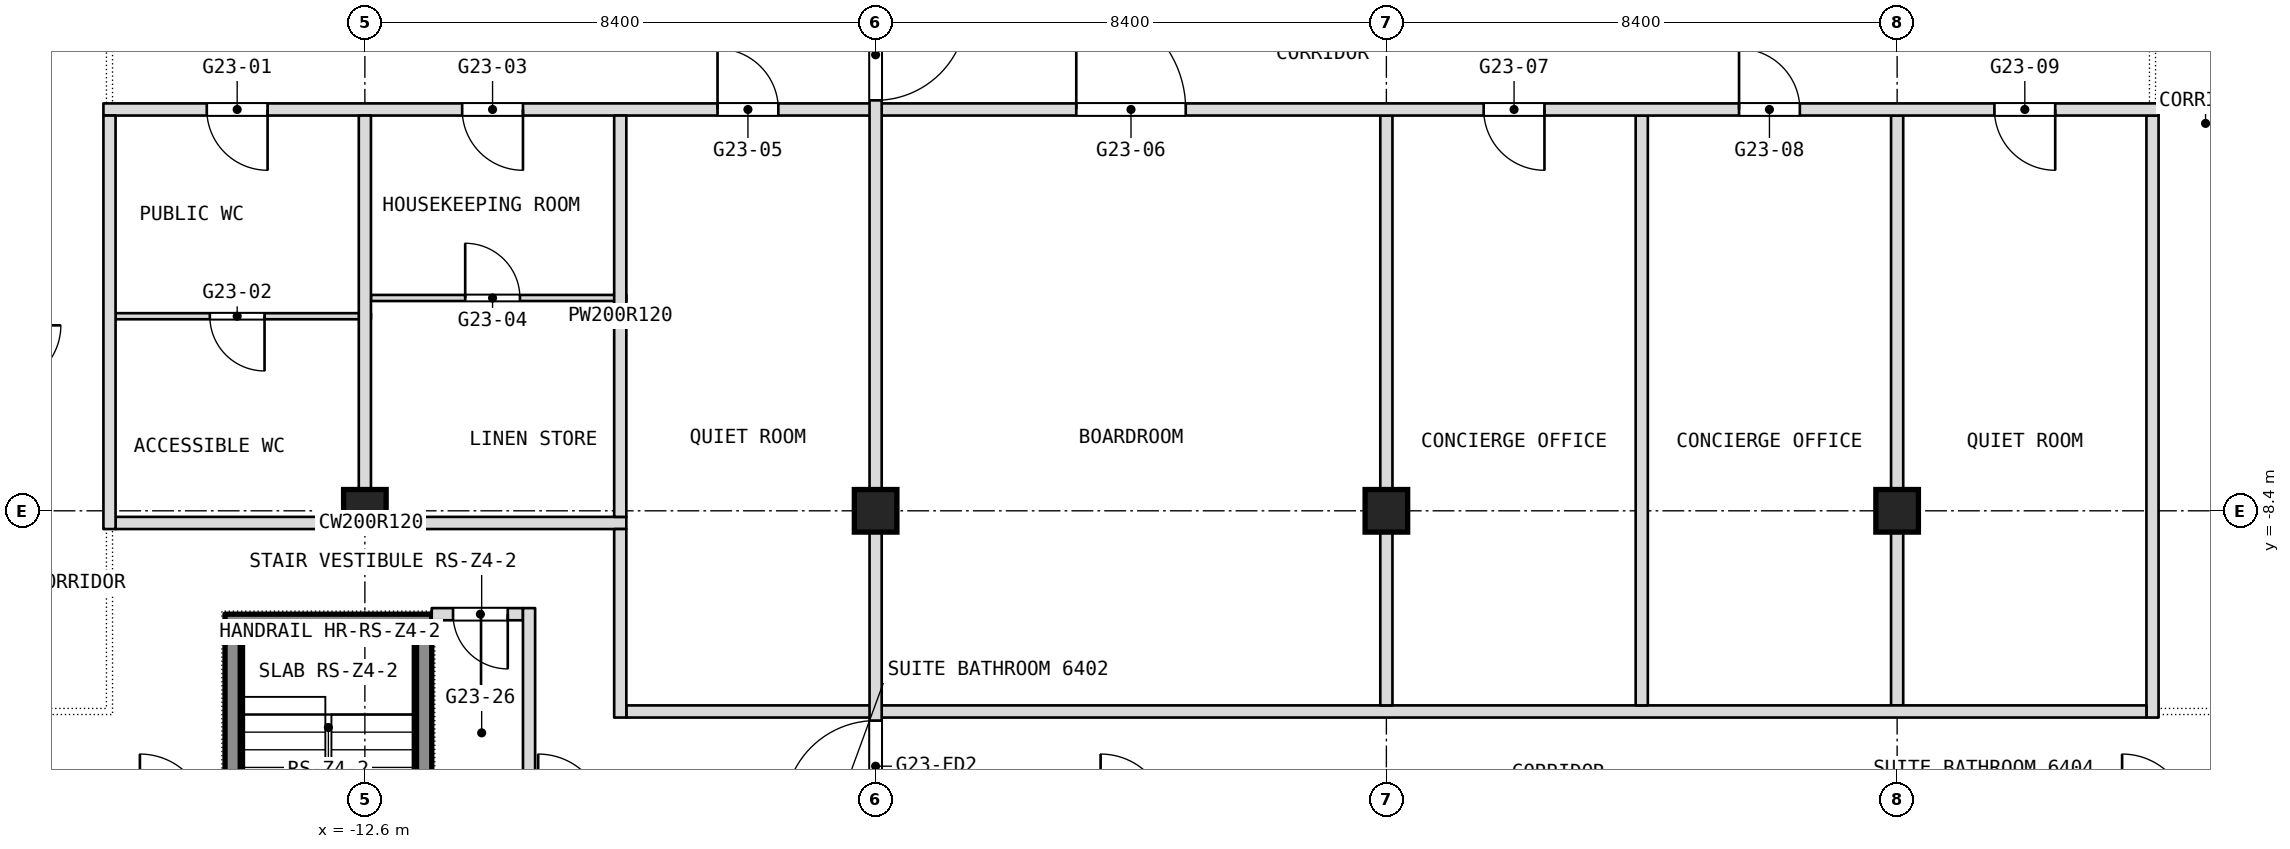
"""IFC4 building model, lengths in metres.
Left out: names, types, materials, properties, quantities, classifications, styles, units other than length and angle.
Written with IfcOpenShell. Run it as: python <this file> out.ifc"""

import sys

from ifc_helpers import new_model, si_unit, direction, frame, frame_2d, origin, origin_2d, place, context, subcontext, project, spatial, rectangle, extrude, element, fill, save


model = new_model("IFC4")
c1 = context("Model", 3, precision=1e-05, world=origin(), true_north=direction((0.0, 1.0)))
c2 = subcontext(c1, "Body", "Model", "MODEL_VIEW")
j1 = project(units=[si_unit("LENGTHUNIT", "METRE"), si_unit("PLANEANGLEUNIT", "RADIAN")], contexts=[c1])
p1 = place(None, origin())
s1 = spatial("IfcSite", under=j1, at=p1, CompositionType="ELEMENT")
p2 = place(p1, origin())
s2 = spatial("IfcBuilding", under=s1, at=p2, CompositionType="ELEMENT")
p3 = place(p2, frame((0.0, 0.0, 277.7)))
s3 = spatial("IfcBuildingStorey", under=s2, at=p3, CompositionType="ELEMENT", Elevation=277.7)
for number, where, z_axis, x_axis in (
    (1, (-12.6, -8.4, 0.0), (0.0, 0.0, 1.0), (1.0, 0.0, 0.0)),
    (2, (-4.2, -8.4, 0.0), (0.0, 0.0, 1.0), (1.0, 0.0, 0.0)),
    (3, (4.2, -8.4, 0.0), (0.0, 0.0, 1.0), (1.0, 0.0, 0.0)),
    (4, (12.6, -8.4, 0.0), (0.0, 0.0, 1.0), (1.0, 0.0, 0.0)),
):
    element("IfcColumn", number, at=place(p3, frame(where, z_axis=z_axis, x_axis=x_axis)), inside=s3, PredefinedType="COLUMN", context=c2, shape_type="SweptSolid", body=[
        extrude(rectangle(XDim=0.7, YDim=0.7, at=origin_2d()), origin(), (0.0, 0.0, 1.0), 3.6),
    ])
p4 = place(p3, frame((16.8, -11.8, 0.0), z_axis=(0.0, 0.0, 1.0), x_axis=(0.0, 1.0, 0.0)))
e5 = element("IfcWall", 5, at=p4, inside=s3, PredefinedType="PARTITIONING", context=c2, shape_type="SweptSolid", body=[
    extrude(rectangle(XDim=9.9, YDim=0.2, at=frame_2d((4.95, 0.0))), origin(), (0.0, 0.0, 1.0), 3.34),
])
p5 = place(p3, frame((12.6, -11.6, 0.0), z_axis=(0.0, 0.0, 1.0), x_axis=(0.0, 1.0, 0.0)))
e6 = element("IfcWall", 6, at=p5, inside=s3, PredefinedType="PARTITIONING", context=c2, shape_type="SweptSolid", body=[
    extrude(rectangle(XDim=9.7, YDim=0.2, at=frame_2d((4.85, 0.0))), origin(), (0.0, 0.0, 1.0), 3.34),
])
p6 = place(p3, frame((-8.3, -11.7, 0.0), z_axis=(0.0, 0.0, 1.0), x_axis=(1.0, 0.0, 0.0)))
e7 = element("IfcWall", 7, at=p6, inside=s3, PredefinedType="PARTITIONING", context=c2, shape_type="SweptSolid", body=[
    extrude(rectangle(XDim=25.0, YDim=0.2, at=frame_2d((12.5, 0.0))), origin(), (0.0, 0.0, 1.0), 3.34),
])
p7 = place(p3, frame((-11.5, -10.1, 0.0), z_axis=(0.0, 0.0, 1.0), x_axis=(1.0, 0.0, 0.0)))
e8 = element("IfcWall", 8, at=p7, inside=s3, PredefinedType="PARTITIONING", context=c2, shape_type="SweptSolid", body=[
    extrude(rectangle(XDim=1.5, YDim=0.2, at=frame_2d((0.75, 0.0))), origin(), (0.0, 0.0, 1.0), 3.34),
])
p8 = place(p7, frame((0.35, 0.0, 0.0)))
e9 = element("IfcOpeningElement", 9, at=p8, cuts=e8, PredefinedType="OPENING", context=c2, shape_type="SweptSolid", body=[
    extrude(rectangle(XDim=0.9, YDim=2.1, at=frame_2d((0.45, 1.05))), frame((0.0, 0.1, 0.0), z_axis=(0.0, -1.0, 0.0), x_axis=(1.0, 0.0, 0.0)), (0.0, 0.0, 1.0), 0.2),
])
p9 = place(p3, frame((-16.7, -8.6, 0.0), z_axis=(0.0, 0.0, 1.0), x_axis=(1.0, 0.0, 0.0)))
e10 = element("IfcWall", 10, at=p9, inside=s3, PredefinedType="PARTITIONING", context=c2, shape_type="SweptSolid", body=[
    extrude(rectangle(XDim=8.4, YDim=0.2, at=frame_2d((4.2, 0.0))), origin(), (0.0, 0.0, 1.0), 3.34),
])
p10 = place(p3, frame((8.4, -11.6, 0.0), z_axis=(0.0, 0.0, 1.0), x_axis=(0.0, 1.0, 0.0)))
e11 = element("IfcWall", 11, at=p10, inside=s3, PredefinedType="PARTITIONING", context=c2, shape_type="SweptSolid", body=[
    extrude(rectangle(XDim=9.7, YDim=0.2, at=frame_2d((4.85, 0.0))), origin(), (0.0, 0.0, 1.0), 3.34),
])
p11 = place(p3, frame((-16.7, -5.2, 0.0), z_axis=(0.0, 0.0, 1.0), x_axis=(1.0, 0.0, 0.0)))
e12 = element("IfcWall", 12, at=p11, inside=s3, PredefinedType="PARTITIONING", context=c2, shape_type="SweptSolid", body=[
    extrude(rectangle(XDim=4.2, YDim=0.1, at=frame_2d((2.1, 0.0))), origin(), (0.0, 0.0, 1.0), 3.34),
])
p12 = place(p11, frame((1.55, 0.0, 0.0)))
e13 = element("IfcOpeningElement", 13, at=p12, cuts=e12, PredefinedType="OPENING", context=c2, shape_type="SweptSolid", body=[
    extrude(rectangle(XDim=0.9, YDim=2.1, at=frame_2d((0.45, 1.05))), frame((0.0, 0.05, 0.0), z_axis=(0.0, -1.0, 0.0), x_axis=(1.0, 0.0, 0.0)), (0.0, 0.0, 1.0), 0.1),
])
p13 = place(p3, frame((-12.5, -4.9, 0.0), z_axis=(0.0, 0.0, 1.0), x_axis=(1.0, 0.0, 0.0)))
e14 = element("IfcWall", 14, at=p13, inside=s3, PredefinedType="PARTITIONING", context=c2, shape_type="SweptSolid", body=[
    extrude(rectangle(XDim=4.2, YDim=0.1, at=frame_2d((2.1, 0.0))), origin(), (0.0, 0.0, 1.0), 3.34),
])
p14 = place(p13, frame((1.55, 0.0, 0.0)))
e15 = element("IfcOpeningElement", 15, at=p14, cuts=e14, PredefinedType="OPENING", context=c2, shape_type="SweptSolid", body=[
    extrude(rectangle(XDim=0.9, YDim=2.1, at=frame_2d((0.45, 1.05))), frame((0.0, 0.05, 0.0), z_axis=(0.0, -1.0, 0.0), x_axis=(1.0, 0.0, 0.0)), (0.0, 0.0, 1.0), 0.1),
])
p15 = place(p3, frame((4.2, -11.6, 0.0), z_axis=(0.0, 0.0, 1.0), x_axis=(0.0, 1.0, 0.0)))
e16 = element("IfcWall", 16, at=p15, inside=s3, PredefinedType="PARTITIONING", context=c2, shape_type="SweptSolid", body=[
    extrude(rectangle(XDim=9.7, YDim=0.2, at=frame_2d((4.85, 0.0))), origin(), (0.0, 0.0, 1.0), 3.34),
])
p16 = place(p3, frame((-16.9, -1.8, 0.0), z_axis=(0.0, 0.0, 1.0), x_axis=(1.0, 0.0, 0.0)))
e17 = element("IfcWall", 17, at=p16, inside=s3, PredefinedType="PARTITIONING", context=c2, shape_type="SweptSolid", body=[
    extrude(rectangle(XDim=33.8, YDim=0.2, at=frame_2d((16.9, 0.0))), origin(), (0.0, 0.0, 1.0), 3.34),
])
p17 = place(p16, frame((1.7, 0.0, 0.0)))
e18 = element("IfcOpeningElement", 18, at=p17, cuts=e17, PredefinedType="OPENING", context=c2, shape_type="SweptSolid", body=[
    extrude(rectangle(XDim=1.0, YDim=2.1, at=frame_2d((0.5, 1.05))), frame((0.0, 0.1, 0.0), z_axis=(0.0, -1.0, 0.0), x_axis=(1.0, 0.0, 0.0)), (0.0, 0.0, 1.0), 0.2),
])
p18 = place(p16, frame((5.9, 0.0, 0.0)))
e19 = element("IfcOpeningElement", 19, at=p18, cuts=e17, PredefinedType="OPENING", context=c2, shape_type="SweptSolid", body=[
    extrude(rectangle(XDim=1.0, YDim=2.1, at=frame_2d((0.5, 1.05))), frame((0.0, 0.1, 0.0), z_axis=(0.0, -1.0, 0.0), x_axis=(1.0, 0.0, 0.0)), (0.0, 0.0, 1.0), 0.2),
])
p19 = place(p16, frame((10.1, 0.0, 0.0)))
e20 = element("IfcOpeningElement", 20, at=p19, cuts=e17, PredefinedType="OPENING", context=c2, shape_type="SweptSolid", body=[
    extrude(rectangle(XDim=1.0, YDim=2.1, at=frame_2d((0.5, 1.05))), frame((0.0, 0.1, 0.0), z_axis=(0.0, -1.0, 0.0), x_axis=(1.0, 0.0, 0.0)), (0.0, 0.0, 1.0), 0.2),
])
p20 = place(p16, frame((16.0, 0.0, 0.0)))
e21 = element("IfcOpeningElement", 21, at=p20, cuts=e17, PredefinedType="OPENING", context=c2, shape_type="SweptSolid", body=[
    extrude(rectangle(XDim=1.8, YDim=2.1, at=frame_2d((0.9, 1.05))), frame((0.0, 0.1, 0.0), z_axis=(0.0, -1.0, 0.0), x_axis=(1.0, 0.0, 0.0)), (0.0, 0.0, 1.0), 0.2),
])
p21 = place(p16, frame((22.7, 0.0, 0.0)))
e22 = element("IfcOpeningElement", 22, at=p21, cuts=e17, PredefinedType="OPENING", context=c2, shape_type="SweptSolid", body=[
    extrude(rectangle(XDim=1.0, YDim=2.1, at=frame_2d((0.5, 1.05))), frame((0.0, 0.1, 0.0), z_axis=(0.0, -1.0, 0.0), x_axis=(1.0, 0.0, 0.0)), (0.0, 0.0, 1.0), 0.2),
])
p22 = place(p16, frame((26.9, 0.0, 0.0)))
e23 = element("IfcOpeningElement", 23, at=p22, cuts=e17, PredefinedType="OPENING", context=c2, shape_type="SweptSolid", body=[
    extrude(rectangle(XDim=1.0, YDim=2.1, at=frame_2d((0.5, 1.05))), frame((0.0, 0.1, 0.0), z_axis=(0.0, -1.0, 0.0), x_axis=(1.0, 0.0, 0.0)), (0.0, 0.0, 1.0), 0.2),
])
p23 = place(p16, frame((31.1, 0.0, 0.0)))
e24 = element("IfcOpeningElement", 24, at=p23, cuts=e17, PredefinedType="OPENING", context=c2, shape_type="SweptSolid", body=[
    extrude(rectangle(XDim=1.0, YDim=2.1, at=frame_2d((0.5, 1.05))), frame((0.0, 0.1, 0.0), z_axis=(0.0, -1.0, 0.0), x_axis=(1.0, 0.0, 0.0)), (0.0, 0.0, 1.0), 0.2),
])
p24 = place(p3, frame((-4.2, -13.6, 0.0), z_axis=(0.0, 0.0, 1.0), x_axis=(0.0, 1.0, 0.0)))
e25 = element("IfcWall", 25, at=p24, inside=s3, PredefinedType="PARTITIONING", context=c2, shape_type="SweptSolid", body=[
    extrude(rectangle(XDim=13.6, YDim=0.2, at=frame_2d((6.8, 0.0))), origin(), (0.0, 0.0, 1.0), 3.34),
])
p25 = place(p24, frame((11.95, 0.0, 0.0)))
e26 = element("IfcOpeningElement", 26, at=p25, cuts=e25, PredefinedType="OPENING", context=c2, shape_type="SweptSolid", body=[
    extrude(rectangle(XDim=1.5, YDim=2.1, at=frame_2d((0.75, 1.05))), frame((0.0, 0.1, 0.0), z_axis=(0.0, -1.0, 0.0), x_axis=(1.0, 0.0, 0.0)), (0.0, 0.0, 1.0), 0.2),
])
p26 = place(p24, frame((0.25, 0.0, 0.0)))
e27 = element("IfcOpeningElement", 27, at=p26, cuts=e25, PredefinedType="OPENING", context=c2, shape_type="SweptSolid", body=[
    extrude(rectangle(XDim=1.5, YDim=2.1, at=frame_2d((0.75, 1.05))), frame((0.0, 0.1, 0.0), z_axis=(0.0, -1.0, 0.0), x_axis=(1.0, 0.0, 0.0)), (0.0, 0.0, 1.0), 0.2),
])
p27 = place(p3, frame((-8.4, -11.8, 0.0), z_axis=(0.0, 0.0, 1.0), x_axis=(0.0, 1.0, 0.0)))
e28 = element("IfcWall", 28, at=p27, inside=s3, PredefinedType="PARTITIONING", context=c2, shape_type="SweptSolid", body=[
    extrude(rectangle(XDim=3.1, YDim=0.2, at=frame_2d((1.55, 0.0))), origin(), (0.0, 0.0, 1.0), 3.34),
])
p28 = place(p3, frame((-8.4, -8.5, 0.0), z_axis=(0.0, 0.0, 1.0), x_axis=(0.0, 1.0, 0.0)))
e29 = element("IfcWall", 29, at=p28, inside=s3, PredefinedType="PARTITIONING", context=c2, shape_type="SweptSolid", body=[
    extrude(rectangle(XDim=6.6, YDim=0.2, at=frame_2d((3.3, 0.0))), origin(), (0.0, 0.0, 1.0), 3.34),
])
p29 = place(p3, frame((-9.9, -13.4, 0.0), z_axis=(0.0, 0.0, 1.0), x_axis=(0.0, 1.0, 0.0)))
e30 = element("IfcWall", 30, at=p29, inside=s3, PredefinedType="PARTITIONING", context=c2, shape_type="SweptSolid", body=[
    extrude(rectangle(XDim=3.4, YDim=0.2, at=frame_2d((1.7, 0.0))), origin(), (0.0, 0.0, 1.0), 3.34),
])
p30 = place(p3, frame((-12.6, -8.5, 0.0), z_axis=(0.0, 0.0, 1.0), x_axis=(0.0, 1.0, 0.0)))
e31 = element("IfcWall", 31, at=p30, inside=s3, PredefinedType="PARTITIONING", context=c2, shape_type="SweptSolid", body=[
    extrude(rectangle(XDim=6.6, YDim=0.2, at=frame_2d((3.3, 0.0))), origin(), (0.0, 0.0, 1.0), 3.34),
])
p31 = place(p3, frame((-16.8, -8.7, 0.0), z_axis=(0.0, 0.0, 1.0), x_axis=(0.0, 1.0, 0.0)))
e32 = element("IfcWall", 32, at=p31, inside=s3, PredefinedType="PARTITIONING", context=c2, shape_type="SweptSolid", body=[
    extrude(rectangle(XDim=6.8, YDim=0.2, at=frame_2d((3.4, 0.0))), origin(), (0.0, 0.0, 1.0), 3.34),
])
p32 = place(p3, frame((-14.9, -10.225, 0.1), z_axis=(0.0, 0.0, 1.0), x_axis=(1.0, 0.0, 0.0)))
e33 = element("IfcWall", 33, at=p32, inside=s3, PredefinedType="SHEAR", context=c2, shape_type="SweptSolid", body=[
    extrude(rectangle(XDim=3.4, YDim=0.25, at=frame_2d((1.7, 0.0))), origin(), (0.0, 0.0, 1.0), 3.6),
])
p33 = place(p3, frame((-14.775, -16.05, 0.1), z_axis=(0.0, 0.0, 1.0), x_axis=(0.0, 1.0, 0.0)))
e34 = element("IfcWall", 34, at=p33, inside=s3, PredefinedType="SHEAR", context=c2, shape_type="SweptSolid", body=[
    extrude(rectangle(XDim=5.7, YDim=0.25, at=frame_2d((2.85, 0.0))), origin(), (0.0, 0.0, 1.0), 3.6),
])
p34 = place(p3, frame((-11.625, -16.05, 0.1), z_axis=(0.0, 0.0, 1.0), x_axis=(0.0, 1.0, 0.0)))
e35 = element("IfcWall", 35, at=p34, inside=s3, PredefinedType="SHEAR", context=c2, shape_type="SweptSolid", body=[
    extrude(rectangle(XDim=5.7, YDim=0.25, at=frame_2d((2.85, 0.0))), origin(), (0.0, 0.0, 1.0), 3.6),
])
p35 = place(p34, frame((0.2, 0.0, 0.0)))
e36 = element("IfcOpeningElement", 36, at=p35, cuts=e35, PredefinedType="OPENING", context=c2, shape_type="SweptSolid", body=[
    extrude(rectangle(XDim=1.0, YDim=2.1, at=frame_2d((0.5, 1.05))), frame((0.0, 0.125, 0.0), z_axis=(0.0, -1.0, 0.0), x_axis=(1.0, 0.0, 0.0)), (0.0, 0.0, 1.0), 0.25),
])
p36 = place(p17, origin())
e37 = element("IfcDoor", 37, at=p36, inside=s3, OperationType="SINGLE_SWING_LEFT", PredefinedType="DOOR", context=c2, shape_type="SweptSolid", body=[
    extrude(rectangle(XDim=1.0, YDim=2.1, at=frame_2d((0.5, 1.05))), frame((0.0, 0.025, 0.0), z_axis=(0.0, -1.0, 0.0), x_axis=(1.0, 0.0, 0.0)), (0.0, 0.0, 1.0), 0.05),
])
fill(e18, e37)
p37 = place(p12, origin())
e38 = element("IfcDoor", 38, at=p37, inside=s3, OperationType="SINGLE_SWING_RIGHT", PredefinedType="DOOR", context=c2, shape_type="SweptSolid", body=[
    extrude(rectangle(XDim=0.9, YDim=2.1, at=frame_2d((0.45, 1.05))), frame((0.0, 0.025, 0.0), z_axis=(0.0, -1.0, 0.0), x_axis=(1.0, 0.0, 0.0)), (0.0, 0.0, 1.0), 0.05),
])
fill(e13, e38)
p38 = place(p18, origin())
e39 = element("IfcDoor", 39, at=p38, inside=s3, OperationType="SINGLE_SWING_LEFT", PredefinedType="DOOR", context=c2, shape_type="SweptSolid", body=[
    extrude(rectangle(XDim=1.0, YDim=2.1, at=frame_2d((0.5, 1.05))), frame((0.0, 0.025, 0.0), z_axis=(0.0, -1.0, 0.0), x_axis=(1.0, 0.0, 0.0)), (0.0, 0.0, 1.0), 0.05),
])
fill(e19, e39)
p39 = place(p14, origin())
e40 = element("IfcDoor", 40, at=p39, inside=s3, OperationType="SINGLE_SWING_RIGHT", PredefinedType="DOOR", context=c2, shape_type="SweptSolid", body=[
    extrude(rectangle(XDim=0.9, YDim=2.1, at=frame_2d((0.45, 1.05))), frame((0.0, 0.025, 0.0), z_axis=(0.0, -1.0, 0.0), x_axis=(1.0, 0.0, 0.0)), (0.0, 0.0, 1.0), 0.05),
])
fill(e15, e40)
p40 = place(p19, origin())
e41 = element("IfcDoor", 41, at=p40, inside=s3, OperationType="SINGLE_SWING_RIGHT", PredefinedType="DOOR", context=c2, shape_type="SweptSolid", body=[
    extrude(rectangle(XDim=1.0, YDim=2.1, at=frame_2d((0.5, 1.05))), frame((0.0, 0.025, 0.0), z_axis=(0.0, -1.0, 0.0), x_axis=(1.0, 0.0, 0.0)), (0.0, 0.0, 1.0), 0.05),
])
fill(e20, e41)
p41 = place(p20, origin())
e42 = element("IfcDoor", 42, at=p41, inside=s3, OperationType="DOUBLE_DOOR_SINGLE_SWING", PredefinedType="DOOR", context=c2, shape_type="SweptSolid", body=[
    extrude(rectangle(XDim=1.8, YDim=2.1, at=frame_2d((0.9, 1.05))), frame((0.0, 0.025, 0.0), z_axis=(0.0, -1.0, 0.0), x_axis=(1.0, 0.0, 0.0)), (0.0, 0.0, 1.0), 0.05),
])
fill(e21, e42)
p42 = place(p21, origin())
e43 = element("IfcDoor", 43, at=p42, inside=s3, OperationType="SINGLE_SWING_RIGHT", PredefinedType="DOOR", context=c2, shape_type="SweptSolid", body=[
    extrude(rectangle(XDim=1.0, YDim=2.1, at=frame_2d((0.5, 1.05))), frame((0.0, 0.025, 0.0), z_axis=(0.0, -1.0, 0.0), x_axis=(1.0, 0.0, 0.0)), (0.0, 0.0, 1.0), 0.05),
])
fill(e22, e43)
p43 = place(p22, origin())
e44 = element("IfcDoor", 44, at=p43, inside=s3, OperationType="SINGLE_SWING_LEFT", PredefinedType="DOOR", context=c2, shape_type="SweptSolid", body=[
    extrude(rectangle(XDim=1.0, YDim=2.1, at=frame_2d((0.5, 1.05))), frame((0.0, 0.025, 0.0), z_axis=(0.0, -1.0, 0.0), x_axis=(1.0, 0.0, 0.0)), (0.0, 0.0, 1.0), 0.05),
])
fill(e23, e44)
p44 = place(p23, origin())
e45 = element("IfcDoor", 45, at=p44, inside=s3, OperationType="SINGLE_SWING_RIGHT", PredefinedType="DOOR", context=c2, shape_type="SweptSolid", body=[
    extrude(rectangle(XDim=1.0, YDim=2.1, at=frame_2d((0.5, 1.05))), frame((0.0, 0.025, 0.0), z_axis=(0.0, -1.0, 0.0), x_axis=(1.0, 0.0, 0.0)), (0.0, 0.0, 1.0), 0.05),
])
fill(e24, e45)
p45 = place(p8, origin())
e46 = element("IfcDoor", 46, at=p45, inside=s3, OperationType="SINGLE_SWING_LEFT", PredefinedType="DOOR", context=c2, shape_type="SweptSolid", body=[
    extrude(rectangle(XDim=0.9, YDim=2.1, at=frame_2d((0.45, 1.05))), frame((0.0, 0.025, 0.0), z_axis=(0.0, -1.0, 0.0), x_axis=(1.0, 0.0, 0.0)), (0.0, 0.0, 1.0), 0.05),
])
fill(e9, e46)
p46 = place(p25, origin())
e47 = element("IfcDoor", 47, at=p46, inside=s3, OperationType="DOUBLE_DOOR_DOUBLE_SWING", PredefinedType="DOOR", context=c2, shape_type="SweptSolid", body=[
    extrude(rectangle(XDim=1.5, YDim=2.1, at=frame_2d((0.75, 1.05))), frame((0.0, 0.025, 0.0), z_axis=(0.0, -1.0, 0.0), x_axis=(1.0, 0.0, 0.0)), (0.0, 0.0, 1.0), 0.05),
])
fill(e26, e47)
p47 = place(p26, origin())
e48 = element("IfcDoor", 48, at=p47, inside=s3, OperationType="DOUBLE_DOOR_DOUBLE_SWING", PredefinedType="DOOR", context=c2, shape_type="SweptSolid", body=[
    extrude(rectangle(XDim=1.5, YDim=2.1, at=frame_2d((0.75, 1.05))), frame((0.0, 0.025, 0.0), z_axis=(0.0, -1.0, 0.0), x_axis=(1.0, 0.0, 0.0)), (0.0, 0.0, 1.0), 0.05),
])
fill(e27, e48)
save(model, sys.argv[1])
